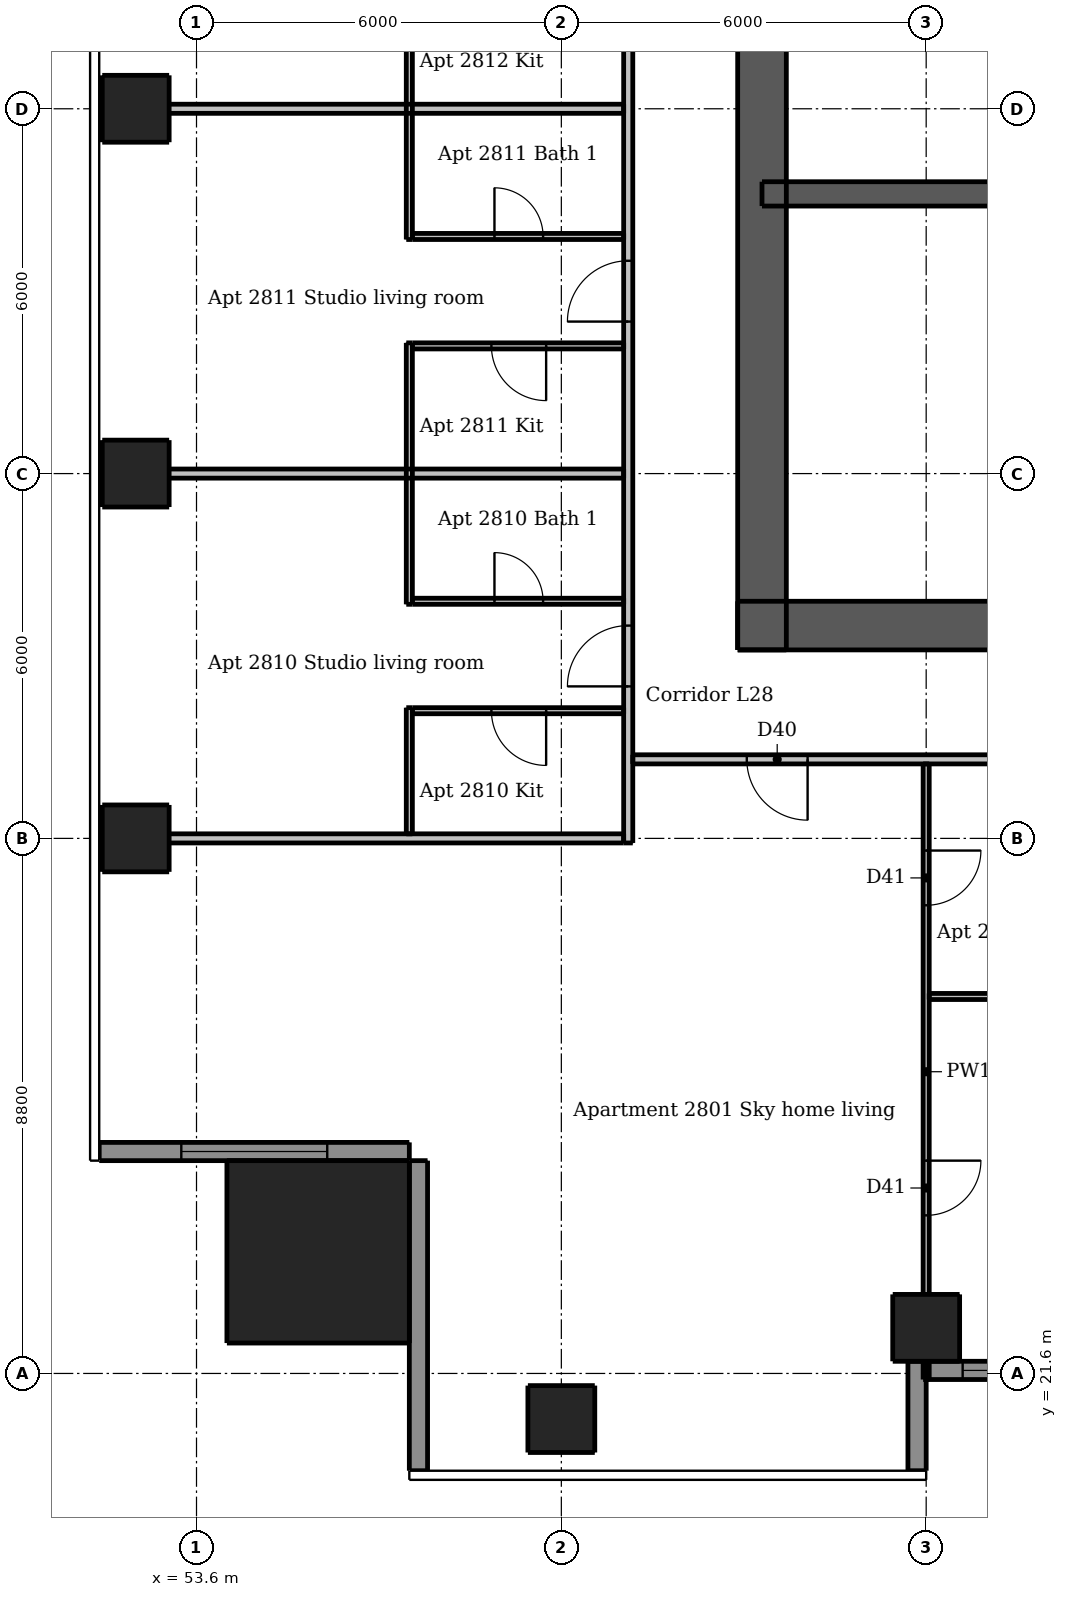
"""IFC4 building model, lengths in metres.
Left out: names, types, materials, properties, quantities, classifications, styles, units other than length and angle.
Written with IfcOpenShell. Run it as: python <this file> out.ifc"""

import sys

from ifc_helpers import new_model, si_unit, direction, frame, frame_2d, origin, origin_2d, place, context, subcontext, project, spatial, rectangle, extrude, element, fill, save


model = new_model("IFC4")
c1 = context("Model", 3, precision=1e-05, world=origin(), true_north=direction((0.0, 1.0)))
c2 = subcontext(c1, "Body", "Model", "MODEL_VIEW")
j1 = project(units=[si_unit("LENGTHUNIT", "METRE"), si_unit("PLANEANGLEUNIT", "RADIAN")], contexts=[c1])
p1 = place(None, origin())
s1 = spatial("IfcSite", under=j1, at=p1, CompositionType="ELEMENT")
p2 = place(p1, origin())
s2 = spatial("IfcBuilding", under=s1, at=p2, CompositionType="ELEMENT")
p3 = place(p2, frame((0.0, 0.0, 105.1)))
s3 = spatial("IfcBuildingStorey", under=s2, at=p3, CompositionType="ELEMENT", Elevation=105.1)
p4 = place(p3, frame((62.5, 33.9, 0.0), z_axis=(0.0, 0.0, 1.0), x_axis=(1.0, 0.0, 0.0)))
e1 = element("IfcWall", 1, at=p4, inside=s3, PredefinedType="SHEAR", context=c2, shape_type="SweptSolid", body=[
    extrude(rectangle(XDim=24.0, YDim=0.8, at=frame_2d((12.0, 0.0))), origin(), (0.0, 0.0, 1.0), 3.05),
])
p5 = place(p4, frame((2.0, 0.0, 0.0)))
e2 = element("IfcOpeningElement", 2, at=p5, cuts=e1, PredefinedType="OPENING", context=c2, shape_type="SweptSolid", body=[
    extrude(rectangle(XDim=1.1, YDim=2.1, at=frame_2d((0.55, 1.05))), frame((0.0, 0.41, 0.0), z_axis=(0.0, -1.0, 0.0), x_axis=(1.0, 0.0, 0.0)), (0.0, 0.0, 1.0), 0.82),
])
p6 = place(p4, frame((20.9, 0.0, 0.0)))
e3 = element("IfcOpeningElement", 3, at=p6, cuts=e1, PredefinedType="OPENING", context=c2, shape_type="SweptSolid", body=[
    extrude(rectangle(XDim=1.1, YDim=2.1, at=frame_2d((0.55, 1.05))), frame((0.0, 0.41, 0.0), z_axis=(0.0, -1.0, 0.0), x_axis=(1.0, 0.0, 0.0)), (0.0, 0.0, 1.0), 0.82),
])
p7 = place(p4, frame((8.0, 0.0, 0.0)))
e4 = element("IfcOpeningElement", 4, at=p7, cuts=e1, PredefinedType="OPENING", context=c2, shape_type="SweptSolid", body=[
    extrude(rectangle(XDim=1.1, YDim=2.1, at=frame_2d((0.55, 1.05))), frame((0.0, 0.41, 0.0), z_axis=(0.0, -1.0, 0.0), x_axis=(1.0, 0.0, 0.0)), (0.0, 0.0, 1.0), 0.82),
])
p8 = place(p4, frame((15.3, 0.0, 0.0)))
e5 = element("IfcOpeningElement", 5, at=p8, cuts=e1, PredefinedType="OPENING", context=c2, shape_type="SweptSolid", body=[
    extrude(rectangle(XDim=0.9, YDim=2.1, at=frame_2d((0.45, 1.05))), frame((0.0, 0.41, 0.0), z_axis=(0.0, -1.0, 0.0), x_axis=(1.0, 0.0, 0.0)), (0.0, 0.0, 1.0), 0.82),
])
p9 = place(p3, frame((62.9, 33.5, 0.0), z_axis=(0.0, 0.0, 1.0), x_axis=(0.0, 1.0, 0.0)))
e6 = element("IfcWall", 6, at=p9, inside=s3, PredefinedType="SHEAR", context=c2, shape_type="SweptSolid", body=[
    extrude(rectangle(XDim=24.0, YDim=0.8, at=frame_2d((12.0, 0.0))), origin(), (0.0, 0.0, 1.0), 3.05),
])
p10 = place(p9, frame((11.2, 0.0, 0.0)))
e7 = element("IfcOpeningElement", 7, at=p10, cuts=e6, PredefinedType="OPENING", context=c2, shape_type="SweptSolid", body=[
    extrude(rectangle(XDim=1.6, YDim=2.1, at=frame_2d((0.8, 1.05))), frame((0.0, 0.41, 0.0), z_axis=(0.0, -1.0, 0.0), x_axis=(1.0, 0.0, 0.0)), (0.0, 0.0, 1.0), 0.82),
])
p11 = place(p3, frame((62.9, 41.0, 0.0), z_axis=(0.0, 0.0, 1.0), x_axis=(1.0, 0.0, 0.0)))
e8 = element("IfcWall", 8, at=p11, inside=s3, PredefinedType="SHEAR", context=c2, shape_type="SweptSolid", body=[
    extrude(rectangle(XDim=23.2, YDim=0.4, at=frame_2d((11.6, 0.0))), origin(), (0.0, 0.0, 1.0), 3.05),
])
for number, where, z_axis, x_axis in (
    (9, (59.6, 20.85, 0.0), (0.0, 0.0, 1.0), (1.0, 0.0, 0.0)),
    (10, (65.6, 22.35, 0.0), (0.0, 0.0, 1.0), (1.0, 0.0, 0.0)),
    (11, (52.6, 30.4, 0.0), (0.0, 0.0, 1.0), (1.0, 0.0, 0.0)),
    (12, (52.6, 36.4, 0.0), (0.0, 0.0, 1.0), (1.0, 0.0, 0.0)),
    (13, (52.6, 42.4, 0.0), (0.0, 0.0, 1.0), (1.0, 0.0, 0.0)),
):
    element("IfcColumn", number, at=place(p3, frame(where, z_axis=z_axis, x_axis=x_axis)), inside=s3, PredefinedType="COLUMN", context=c2, shape_type="SweptSolid", body=[
        extrude(rectangle(XDim=1.1, YDim=1.1, at=origin_2d()), origin(), (0.0, 0.0, 1.0), 3.05),
    ])
p12 = place(p3, frame((55.6, 23.6, 0.0), z_axis=(0.0, 0.0, 1.0), x_axis=(1.0, 0.0, 0.0)))
e14 = element("IfcColumn", 14, at=p12, inside=s3, PredefinedType="COLUMN", context=c2, shape_type="SweptSolid", body=[
    extrude(rectangle(XDim=3.0, YDim=3.0, at=origin_2d()), origin(), (0.0, 0.0, 1.0), 3.3),
])
p13 = place(p3, frame((65.45, 20.0, 0.0), z_axis=(0.0, 0.0, 1.0), x_axis=(0.0, 1.0, 0.0)))
e15 = element("IfcWall", 15, at=p13, inside=s3, PredefinedType="SOLIDWALL", context=c2, shape_type="SweptSolid", body=[
    extrude(rectangle(XDim=1.8, YDim=0.3, at=frame_2d((0.9, 0.0))), origin(), (0.0, 0.0, 1.0), 3.05),
])
p14 = place(p3, frame((52.0, 25.25, 0.0), z_axis=(0.0, 0.0, 1.0), x_axis=(1.0, 0.0, 0.0)))
e16 = element("IfcWall", 16, at=p14, inside=s3, PredefinedType="SOLIDWALL", context=c2, shape_type="SweptSolid", body=[
    extrude(rectangle(XDim=5.1, YDim=0.3, at=frame_2d((2.55, 0.0))), origin(), (0.0, 0.0, 1.0), 3.05),
])
p15 = place(p14, frame((1.35, 0.0, 0.15)))
e17 = element("IfcOpeningElement", 17, at=p15, cuts=e16, PredefinedType="OPENING", context=c2, shape_type="SweptSolid", body=[
    extrude(rectangle(XDim=2.4, YDim=2.1, at=frame_2d((1.2, 1.05))), frame((0.0, 0.16, 0.0), z_axis=(0.0, -1.0, 0.0), x_axis=(1.0, 0.0, 0.0)), (0.0, 0.0, 1.0), 0.32),
])
p16 = place(p3, frame((57.25, 25.1, 0.0), z_axis=(0.0, 0.0, 1.0), x_axis=(0.0, -1.0, 0.0)))
e18 = element("IfcWall", 18, at=p16, inside=s3, PredefinedType="SOLIDWALL", context=c2, shape_type="SweptSolid", body=[
    extrude(rectangle(XDim=5.1, YDim=0.3, at=frame_2d((2.55, 0.0))), origin(), (0.0, 0.0, 1.0), 3.05),
])
p17 = place(p3, frame((65.6, 21.65, 0.0), z_axis=(0.0, 0.0, 1.0), x_axis=(1.0, 0.0, 0.0)))
e19 = element("IfcWall", 19, at=p17, inside=s3, PredefinedType="SOLIDWALL", context=c2, shape_type="SweptSolid", body=[
    extrude(rectangle(XDim=6.0, YDim=0.3, at=frame_2d((3.0, 0.0))), origin(), (0.0, 0.0, 1.0), 3.05),
])
p18 = place(p17, frame((0.6, 0.0, 0.15)))
e20 = element("IfcOpeningElement", 20, at=p18, cuts=e19, PredefinedType="OPENING", context=c2, shape_type="SweptSolid", body=[
    extrude(rectangle(XDim=1.8, YDim=2.1, at=frame_2d((0.9, 1.05))), frame((0.0, 0.16, 0.0), z_axis=(0.0, -1.0, 0.0), x_axis=(1.0, 0.0, 0.0)), (0.0, 0.0, 1.0), 0.32),
])
p19 = place(p17, frame((3.6, 0.0, 0.15)))
e21 = element("IfcOpeningElement", 21, at=p19, cuts=e19, PredefinedType="OPENING", context=c2, shape_type="SweptSolid", body=[
    extrude(rectangle(XDim=1.8, YDim=2.1, at=frame_2d((0.9, 1.05))), frame((0.0, 0.16, 0.0), z_axis=(0.0, -1.0, 0.0), x_axis=(1.0, 0.0, 0.0)), (0.0, 0.0, 1.0), 0.32),
])
p20 = place(p3, frame((57.1, 30.475, 0.0), z_axis=(0.0, 0.0, 1.0), x_axis=(0.0, 1.0, 0.0)))
e22 = element("IfcWall", 22, at=p20, inside=s3, PredefinedType="PARTITIONING", context=c2, shape_type="SweptSolid", body=[
    extrude(rectangle(XDim=2.075, YDim=0.1, at=frame_2d((1.038, 0.0))), origin(), (0.0, 0.0, 1.0), 3.05),
])
for number, where, z_axis, x_axis in (
    (23, (57.1, 34.25, 0.0), (0.0, 0.0, 1.0), (0.0, 1.0, 0.0)),
    (24, (57.1, 40.25, 0.0), (0.0, 0.0, 1.0), (0.0, 1.0, 0.0)),
):
    element("IfcWall", number, at=place(p3, frame(where, z_axis=z_axis, x_axis=x_axis)), inside=s3, PredefinedType="PARTITIONING", context=c2, shape_type="SweptSolid", body=[
        extrude(rectangle(XDim=4.3, YDim=0.1, at=frame_2d((2.15, 0.0))), origin(), (0.0, 0.0, 1.0), 3.05),
    ])
p21 = place(p3, frame((65.6, 31.625, 0.0), z_axis=(0.0, 0.0, 1.0), x_axis=(0.0, -1.0, 0.0)))
e25 = element("IfcWall", 25, at=p21, inside=s3, PredefinedType="PARTITIONING", context=c2, shape_type="SweptSolid", body=[
    extrude(rectangle(XDim=10.125, YDim=0.1, at=frame_2d((5.062, 0.0))), origin(), (0.0, 0.0, 1.0), 2.516),
])
p22 = place(p21, frame((1.425, 0.0, 0.0)))
e26 = element("IfcOpeningElement", 26, at=p22, cuts=e25, PredefinedType="OPENING", context=c2, shape_type="SweptSolid", body=[
    extrude(rectangle(XDim=0.9, YDim=2.1, at=frame_2d((0.45, 1.05))), frame((0.0, 0.06, 0.0), z_axis=(0.0, -1.0, 0.0), x_axis=(1.0, 0.0, 0.0)), (0.0, 0.0, 1.0), 0.12),
])
p23 = place(p21, frame((6.525, 0.0, 0.0)))
e27 = element("IfcOpeningElement", 27, at=p23, cuts=e25, PredefinedType="OPENING", context=c2, shape_type="SweptSolid", body=[
    extrude(rectangle(XDim=0.9, YDim=2.1, at=frame_2d((0.45, 1.05))), frame((0.0, 0.06, 0.0), z_axis=(0.0, -1.0, 0.0), x_axis=(1.0, 0.0, 0.0)), (0.0, 0.0, 1.0), 0.12),
])
p24 = place(p3, frame((57.15, 40.3, 0.0), z_axis=(0.0, 0.0, 1.0), x_axis=(1.0, 0.0, 0.0)))
e28 = element("IfcWall", 28, at=p24, inside=s3, PredefinedType="PARTITIONING", context=c2, shape_type="SweptSolid", body=[
    extrude(rectangle(XDim=3.475, YDim=0.1, at=frame_2d((1.738, 0.0))), origin(), (0.0, 0.0, 1.0), 3.05),
])
p25 = place(p24, frame((1.35, 0.0, 0.0)))
e29 = element("IfcOpeningElement", 29, at=p25, cuts=e28, PredefinedType="OPENING", context=c2, shape_type="SweptSolid", body=[
    extrude(rectangle(XDim=0.8, YDim=2.1, at=frame_2d((0.4, 1.05))), frame((0.0, 0.06, 0.0), z_axis=(0.0, -1.0, 0.0), x_axis=(1.0, 0.0, 0.0)), (0.0, 0.0, 1.0), 0.12),
])
p26 = place(p3, frame((60.625, 38.5, 0.0), z_axis=(0.0, 0.0, 1.0), x_axis=(-1.0, 0.0, 0.0)))
e30 = element("IfcWall", 30, at=p26, inside=s3, PredefinedType="PARTITIONING", context=c2, shape_type="SweptSolid", body=[
    extrude(rectangle(XDim=3.475, YDim=0.1, at=frame_2d((1.738, 0.0))), origin(), (0.0, 0.0, 1.0), 3.05),
])
p27 = place(p26, frame((1.275, 0.0, 0.0)))
e31 = element("IfcOpeningElement", 31, at=p27, cuts=e30, PredefinedType="OPENING", context=c2, shape_type="SweptSolid", body=[
    extrude(rectangle(XDim=0.9, YDim=2.1, at=frame_2d((0.45, 1.05))), frame((0.0, 0.06, 0.0), z_axis=(0.0, -1.0, 0.0), x_axis=(1.0, 0.0, 0.0)), (0.0, 0.0, 1.0), 0.12),
])
p28 = place(p3, frame((57.15, 34.3, 0.0), z_axis=(0.0, 0.0, 1.0), x_axis=(1.0, 0.0, 0.0)))
e32 = element("IfcWall", 32, at=p28, inside=s3, PredefinedType="PARTITIONING", context=c2, shape_type="SweptSolid", body=[
    extrude(rectangle(XDim=3.475, YDim=0.1, at=frame_2d((1.738, 0.0))), origin(), (0.0, 0.0, 1.0), 3.05),
])
p29 = place(p28, frame((1.35, 0.0, 0.0)))
e33 = element("IfcOpeningElement", 33, at=p29, cuts=e32, PredefinedType="OPENING", context=c2, shape_type="SweptSolid", body=[
    extrude(rectangle(XDim=0.8, YDim=2.1, at=frame_2d((0.4, 1.05))), frame((0.0, 0.06, 0.0), z_axis=(0.0, -1.0, 0.0), x_axis=(1.0, 0.0, 0.0)), (0.0, 0.0, 1.0), 0.12),
])
p30 = place(p3, frame((60.625, 32.5, 0.0), z_axis=(0.0, 0.0, 1.0), x_axis=(-1.0, 0.0, 0.0)))
e34 = element("IfcWall", 34, at=p30, inside=s3, PredefinedType="PARTITIONING", context=c2, shape_type="SweptSolid", body=[
    extrude(rectangle(XDim=3.475, YDim=0.1, at=frame_2d((1.738, 0.0))), origin(), (0.0, 0.0, 1.0), 3.05),
])
p31 = place(p30, frame((1.275, 0.0, 0.0)))
e35 = element("IfcOpeningElement", 35, at=p31, cuts=e34, PredefinedType="OPENING", context=c2, shape_type="SweptSolid", body=[
    extrude(rectangle(XDim=0.9, YDim=2.1, at=frame_2d((0.45, 1.05))), frame((0.0, 0.06, 0.0), z_axis=(0.0, -1.0, 0.0), x_axis=(1.0, 0.0, 0.0)), (0.0, 0.0, 1.0), 0.12),
])
p32 = place(p3, frame((65.65, 27.8, 0.0), z_axis=(0.0, 0.0, 1.0), x_axis=(1.0, 0.0, 0.0)))
e36 = element("IfcWall", 36, at=p32, inside=s3, PredefinedType="PARTITIONING", context=c2, shape_type="SweptSolid", body=[
    extrude(rectangle(XDim=5.875, YDim=0.1, at=frame_2d((2.938, 0.0))), origin(), (0.0, 0.0, 1.0), 3.05),
])
p33 = place(p32, frame((3.75, 0.0, 0.0)))
e37 = element("IfcOpeningElement", 37, at=p33, cuts=e36, PredefinedType="OPENING", context=c2, shape_type="SweptSolid", body=[
    extrude(rectangle(XDim=0.8, YDim=2.1, at=frame_2d((0.4, 1.05))), frame((0.0, 0.06, 0.0), z_axis=(0.0, -1.0, 0.0), x_axis=(1.0, 0.0, 0.0)), (0.0, 0.0, 1.0), 0.12),
])
p34 = place(p3, frame((60.7, 30.325, 0.0), z_axis=(0.0, 0.0, 1.0), x_axis=(0.0, 1.0, 0.0)))
e38 = element("IfcWall", 38, at=p34, inside=s3, PredefinedType="PARTITIONING", context=c2, shape_type="SweptSolid", body=[
    extrude(rectangle(XDim=28.9, YDim=0.15, at=frame_2d((14.45, 0.0))), origin(), (0.0, 0.0, 1.0), 3.05),
])
p35 = place(p34, frame((2.575, 0.0, 0.0)))
e39 = element("IfcOpeningElement", 39, at=p35, cuts=e38, PredefinedType="OPENING", context=c2, shape_type="SweptSolid", body=[
    extrude(rectangle(XDim=1.0, YDim=2.1, at=frame_2d((0.5, 1.05))), frame((0.0, 0.085, 0.0), z_axis=(0.0, -1.0, 0.0), x_axis=(1.0, 0.0, 0.0)), (0.0, 0.0, 1.0), 0.17),
])
p36 = place(p34, frame((8.575, 0.0, 0.0)))
e40 = element("IfcOpeningElement", 40, at=p36, cuts=e38, PredefinedType="OPENING", context=c2, shape_type="SweptSolid", body=[
    extrude(rectangle(XDim=1.0, YDim=2.1, at=frame_2d((0.5, 1.05))), frame((0.0, 0.085, 0.0), z_axis=(0.0, -1.0, 0.0), x_axis=(1.0, 0.0, 0.0)), (0.0, 0.0, 1.0), 0.17),
])
p37 = place(p34, frame((14.575, 0.0, 0.0)))
e41 = element("IfcOpeningElement", 41, at=p37, cuts=e38, PredefinedType="OPENING", context=c2, shape_type="SweptSolid", body=[
    extrude(rectangle(XDim=1.0, YDim=2.1, at=frame_2d((0.5, 1.05))), frame((0.0, 0.085, 0.0), z_axis=(0.0, -1.0, 0.0), x_axis=(1.0, 0.0, 0.0)), (0.0, 0.0, 1.0), 0.17),
])
p38 = place(p34, frame((26.025, 0.0, 0.0)))
e42 = element("IfcOpeningElement", 42, at=p38, cuts=e38, PredefinedType="OPENING", context=c2, shape_type="SweptSolid", body=[
    extrude(rectangle(XDim=1.0, YDim=2.1, at=frame_2d((0.5, 1.05))), frame((0.0, 0.085, 0.0), z_axis=(0.0, -1.0, 0.0), x_axis=(1.0, 0.0, 0.0)), (0.0, 0.0, 1.0), 0.17),
])
for number, where, z_axis, x_axis in (
    (43, (52.0, 42.4, 0.0), (0.0, 0.0, 1.0), (1.0, 0.0, 0.0)),
    (44, (52.0, 36.4, 0.0), (0.0, 0.0, 1.0), (1.0, 0.0, 0.0)),
):
    element("IfcWall", number, at=place(p3, frame(where, z_axis=z_axis, x_axis=x_axis)), inside=s3, PredefinedType="PARTITIONING", context=c2, shape_type="SweptSolid", body=[
        extrude(rectangle(XDim=8.625, YDim=0.15, at=frame_2d((4.312, 0.0))), origin(), (0.0, 0.0, 1.0), 2.516),
    ])
p39 = place(p3, frame((89.525, 31.7, 0.0), z_axis=(0.0, 0.0, 1.0), x_axis=(-1.0, 0.0, 0.0)))
e45 = element("IfcWall", 45, at=p39, inside=s3, PredefinedType="PARTITIONING", context=c2, shape_type="SweptSolid", body=[
    extrude(rectangle(XDim=28.75, YDim=0.15, at=frame_2d((14.375, 0.0))), origin(), (0.0, 0.0, 1.0), 3.05),
])
p40 = place(p39, frame((25.875, 0.0, 0.0)))
e46 = element("IfcOpeningElement", 46, at=p40, cuts=e45, PredefinedType="OPENING", context=c2, shape_type="SweptSolid", body=[
    extrude(rectangle(XDim=1.0, YDim=2.1, at=frame_2d((0.5, 1.05))), frame((0.0, 0.085, 0.0), z_axis=(0.0, -1.0, 0.0), x_axis=(1.0, 0.0, 0.0)), (0.0, 0.0, 1.0), 0.17),
])
p41 = place(p39, frame((12.525, 0.0, 0.0)))
e47 = element("IfcOpeningElement", 47, at=p41, cuts=e45, PredefinedType="OPENING", context=c2, shape_type="SweptSolid", body=[
    extrude(rectangle(XDim=1.0, YDim=2.1, at=frame_2d((0.5, 1.05))), frame((0.0, 0.085, 0.0), z_axis=(0.0, -1.0, 0.0), x_axis=(1.0, 0.0, 0.0)), (0.0, 0.0, 1.0), 0.17),
])
p42 = place(p39, frame((4.175, 0.0, 0.0)))
e48 = element("IfcOpeningElement", 48, at=p42, cuts=e45, PredefinedType="OPENING", context=c2, shape_type="SweptSolid", body=[
    extrude(rectangle(XDim=1.0, YDim=2.1, at=frame_2d((0.5, 1.05))), frame((0.0, 0.085, 0.0), z_axis=(0.0, -1.0, 0.0), x_axis=(1.0, 0.0, 0.0)), (0.0, 0.0, 1.0), 0.17),
])
p43 = place(p3, frame((52.0, 30.4, 0.0), z_axis=(0.0, 0.0, 1.0), x_axis=(1.0, 0.0, 0.0)))
e49 = element("IfcWall", 49, at=p43, inside=s3, PredefinedType="PARTITIONING", context=c2, shape_type="SweptSolid", body=[
    extrude(rectangle(XDim=8.625, YDim=0.15, at=frame_2d((4.312, 0.0))), origin(), (0.0, 0.0, 1.0), 2.647),
])
p44 = place(p15, origin())
e50 = element("IfcWindow", 50, at=p44, inside=s3, PartitioningType="DOUBLE_PANEL_VERTICAL", PredefinedType="WINDOW", context=c2, shape_type="SweptSolid", body=[
    extrude(rectangle(XDim=2.4, YDim=2.1, at=frame_2d((1.2, 1.05))), frame((0.0, 0.03, 0.0), z_axis=(0.0, -1.0, 0.0), x_axis=(1.0, 0.0, 0.0)), (0.0, 0.0, 1.0), 0.06),
])
fill(e17, e50)
p45 = place(p18, origin())
e51 = element("IfcWindow", 51, at=p45, inside=s3, PartitioningType="DOUBLE_PANEL_VERTICAL", PredefinedType="WINDOW", context=c2, shape_type="SweptSolid", body=[
    extrude(rectangle(XDim=1.8, YDim=2.1, at=frame_2d((0.9, 1.05))), frame((0.0, 0.03, 0.0), z_axis=(0.0, -1.0, 0.0), x_axis=(1.0, 0.0, 0.0)), (0.0, 0.0, 1.0), 0.06),
])
fill(e20, e51)
p46 = place(p5, origin())
e52 = element("IfcDoor", 52, at=p46, inside=s3, OperationType="SINGLE_SWING_LEFT", PredefinedType="DOOR", context=c2, shape_type="SweptSolid", body=[
    extrude(rectangle(XDim=1.1, YDim=2.1, at=frame_2d((0.55, 1.05))), frame((0.0, 0.388, 0.0), z_axis=(0.0, -1.0, 0.0), x_axis=(1.0, 0.0, 0.0)), (0.0, 0.0, 1.0), 0.05),
])
fill(e2, e52)
p47 = place(p40, origin())
e53 = element("IfcDoor", 53, at=p47, inside=s3, OperationType="SINGLE_SWING_LEFT", PredefinedType="DOOR", context=c2, shape_type="SweptSolid", body=[
    extrude(rectangle(XDim=1.0, YDim=2.1, at=frame_2d((0.5, 1.05))), frame((0.0, 0.025, 0.0), z_axis=(0.0, -1.0, 0.0), x_axis=(1.0, 0.0, 0.0)), (0.0, 0.0, 1.0), 0.05),
])
fill(e46, e53)
p48 = place(p22, origin())
e54 = element("IfcDoor", 54, at=p48, inside=s3, OperationType="SINGLE_SWING_LEFT", PredefinedType="DOOR", context=c2, shape_type="SweptSolid", body=[
    extrude(rectangle(XDim=0.9, YDim=2.1, at=frame_2d((0.45, 1.05))), frame((0.0, 0.025, 0.0), z_axis=(0.0, -1.0, 0.0), x_axis=(1.0, 0.0, 0.0)), (0.0, 0.0, 1.0), 0.05),
])
fill(e26, e54)
p49 = place(p23, origin())
e55 = element("IfcDoor", 55, at=p49, inside=s3, OperationType="SINGLE_SWING_LEFT", PredefinedType="DOOR", context=c2, shape_type="SweptSolid", body=[
    extrude(rectangle(XDim=0.9, YDim=2.1, at=frame_2d((0.45, 1.05))), frame((0.0, 0.025, 0.0), z_axis=(0.0, -1.0, 0.0), x_axis=(1.0, 0.0, 0.0)), (0.0, 0.0, 1.0), 0.05),
])
fill(e27, e55)
p50 = place(p35, origin())
e56 = element("IfcDoor", 56, at=p50, inside=s3, OperationType="SINGLE_SWING_LEFT", PredefinedType="DOOR", context=c2, shape_type="SweptSolid", body=[
    extrude(rectangle(XDim=1.0, YDim=2.1, at=frame_2d((0.5, 1.05))), frame((0.0, 0.025, 0.0), z_axis=(0.0, -1.0, 0.0), x_axis=(1.0, 0.0, 0.0)), (0.0, 0.0, 1.0), 0.05),
])
fill(e39, e56)
p51 = place(p31, origin())
e57 = element("IfcDoor", 57, at=p51, inside=s3, OperationType="SINGLE_SWING_LEFT", PredefinedType="DOOR", context=c2, shape_type="SweptSolid", body=[
    extrude(rectangle(XDim=0.9, YDim=2.1, at=frame_2d((0.45, 1.05))), frame((0.0, 0.025, 0.0), z_axis=(0.0, -1.0, 0.0), x_axis=(1.0, 0.0, 0.0)), (0.0, 0.0, 1.0), 0.05),
])
fill(e35, e57)
p52 = place(p29, origin())
e58 = element("IfcDoor", 58, at=p52, inside=s3, OperationType="SINGLE_SWING_LEFT", PredefinedType="DOOR", context=c2, shape_type="SweptSolid", body=[
    extrude(rectangle(XDim=0.8, YDim=2.1, at=frame_2d((0.4, 1.05))), frame((0.0, 0.025, 0.0), z_axis=(0.0, -1.0, 0.0), x_axis=(1.0, 0.0, 0.0)), (0.0, 0.0, 1.0), 0.05),
])
fill(e33, e58)
p53 = place(p36, origin())
e59 = element("IfcDoor", 59, at=p53, inside=s3, OperationType="SINGLE_SWING_LEFT", PredefinedType="DOOR", context=c2, shape_type="SweptSolid", body=[
    extrude(rectangle(XDim=1.0, YDim=2.1, at=frame_2d((0.5, 1.05))), frame((0.0, 0.025, 0.0), z_axis=(0.0, -1.0, 0.0), x_axis=(1.0, 0.0, 0.0)), (0.0, 0.0, 1.0), 0.05),
])
fill(e40, e59)
p54 = place(p27, origin())
e60 = element("IfcDoor", 60, at=p54, inside=s3, OperationType="SINGLE_SWING_LEFT", PredefinedType="DOOR", context=c2, shape_type="SweptSolid", body=[
    extrude(rectangle(XDim=0.9, YDim=2.1, at=frame_2d((0.45, 1.05))), frame((0.0, 0.025, 0.0), z_axis=(0.0, -1.0, 0.0), x_axis=(1.0, 0.0, 0.0)), (0.0, 0.0, 1.0), 0.05),
])
fill(e31, e60)
p55 = place(p25, origin())
e61 = element("IfcDoor", 61, at=p55, inside=s3, OperationType="SINGLE_SWING_LEFT", PredefinedType="DOOR", context=c2, shape_type="SweptSolid", body=[
    extrude(rectangle(XDim=0.8, YDim=2.1, at=frame_2d((0.4, 1.05))), frame((0.0, 0.025, 0.0), z_axis=(0.0, -1.0, 0.0), x_axis=(1.0, 0.0, 0.0)), (0.0, 0.0, 1.0), 0.05),
])
fill(e29, e61)
save(model, sys.argv[1])
